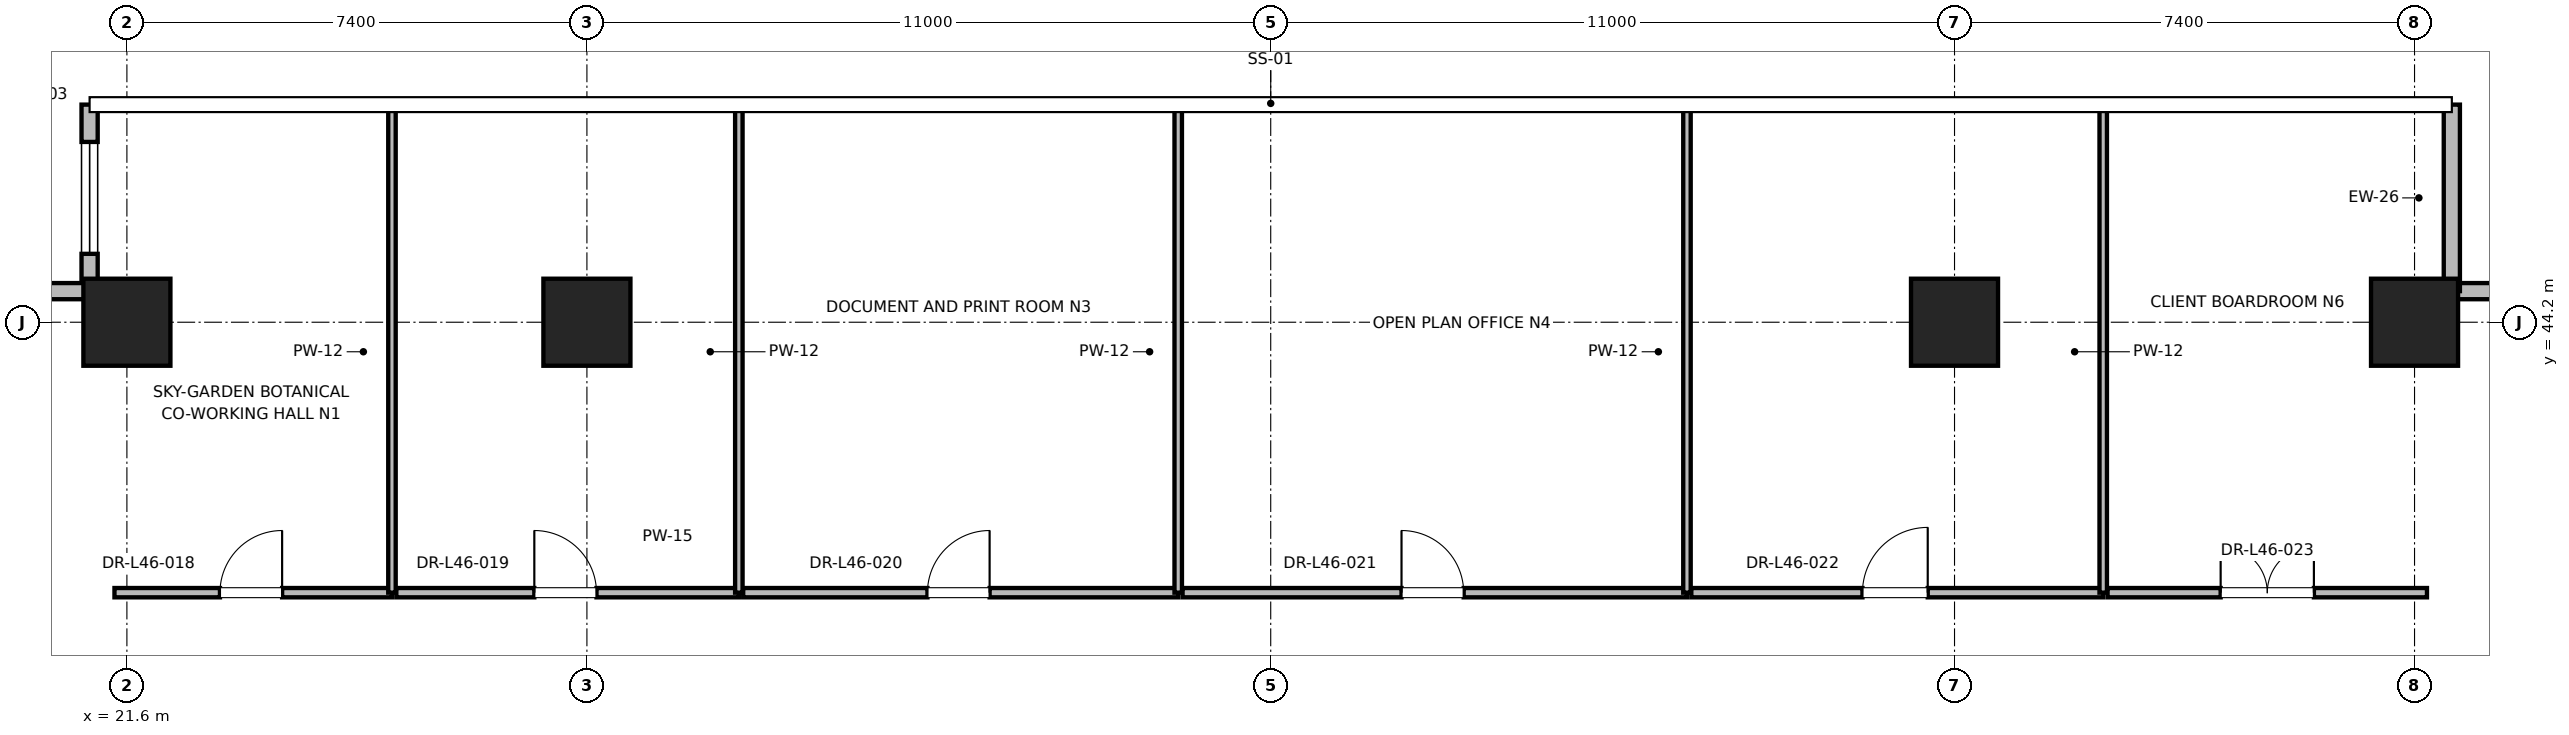
"""IFC4 building model, lengths in metres.
Left out: names, types, materials, properties, quantities, classifications, styles, units other than length and angle.
Written with IfcOpenShell. Run it as: python <this file> out.ifc"""

import sys

from ifc_helpers import new_model, si_unit, direction, frame, frame_2d, origin, origin_2d, place, context, subcontext, project, spatial, rectangle, extrude, element, fill, save


model = new_model("IFC4")
c1 = context("Model", 3, precision=1e-05, world=origin(), true_north=direction((0.0, 1.0)))
c2 = subcontext(c1, "Body", "Model", "MODEL_VIEW")
j1 = project(units=[si_unit("LENGTHUNIT", "METRE"), si_unit("PLANEANGLEUNIT", "RADIAN")], contexts=[c1])
p1 = place(None, origin())
s1 = spatial("IfcSite", under=j1, at=p1, CompositionType="ELEMENT")
p2 = place(p1, origin())
s2 = spatial("IfcBuilding", under=s1, at=p2, CompositionType="ELEMENT")
p3 = place(p2, frame((0.0, 0.0, 200.2)))
s3 = spatial("IfcBuildingStorey", under=s2, at=p3, CompositionType="ELEMENT", Elevation=200.2)
for number, where, z_axis, x_axis in (
    (1, (29.0, 44.2, 0.0), (0.0, 0.0, 1.0), (1.0, 0.0, 0.0)),
    (2, (51.0, 44.2, 0.0), (0.0, 0.0, 1.0), (1.0, 0.0, 0.0)),
    (3, (21.6, 44.2, 0.0), (0.0, 0.0, 1.0), (1.0, 0.0, 0.0)),
    (4, (58.4, 44.2, 0.0), (0.0, 0.0, 1.0), (1.0, 0.0, 0.0)),
):
    element("IfcColumn", number, at=place(p3, frame(where, z_axis=z_axis, x_axis=x_axis)), inside=s3, PredefinedType="COLUMN", context=c2, shape_type="SweptSolid", body=[
        extrude(rectangle(XDim=1.4, YDim=1.4, at=origin_2d()), origin(), (0.0, 0.0, 1.0), 5.0),
    ])
p4 = place(p3, frame((62.4, 44.7, 0.0), z_axis=(0.0, 0.0, 1.0), x_axis=(-1.0, 0.0, 0.0)))
e5 = element("IfcWall", 5, at=p4, inside=s3, PredefinedType="PARAPET", context=c2, shape_type="SweptSolid", body=[
    extrude(rectangle(XDim=3.4, YDim=0.26, at=frame_2d((1.7, 0.0))), origin(), (0.0, 0.0, 1.0), 4.775),
])
p5 = place(p4, frame((0.8, 0.0, 0.85)))
e6 = element("IfcOpeningElement", 6, at=p5, cuts=e5, PredefinedType="OPENING", context=c2, shape_type="SweptSolid", body=[
    extrude(rectangle(XDim=1.8, YDim=2.2, at=frame_2d((0.9, 1.1))), frame((0.0, 0.13, 0.0), z_axis=(0.0, -1.0, 0.0), x_axis=(1.0, 0.0, 0.0)), (0.0, 0.0, 1.0), 0.26),
])
p6 = place(p3, frame((59.0, 44.7, 0.0), z_axis=(0.0, 0.0, 1.0), x_axis=(0.0, 1.0, 0.0)))
e7 = element("IfcWall", 7, at=p6, inside=s3, PredefinedType="PARAPET", context=c2, shape_type="SweptSolid", body=[
    extrude(rectangle(XDim=3.0, YDim=0.26, at=frame_2d((1.5, 0.0))), origin(), (0.0, 0.0, 1.0), 4.775),
])
p7 = place(p3, frame((21.0, 47.7, 0.0), z_axis=(0.0, 0.0, 1.0), x_axis=(0.0, -1.0, 0.0)))
e8 = element("IfcWall", 8, at=p7, inside=s3, PredefinedType="PARAPET", context=c2, shape_type="SweptSolid", body=[
    extrude(rectangle(XDim=3.0, YDim=0.26, at=frame_2d((1.5, 0.0))), origin(), (0.0, 0.0, 1.0), 4.775),
])
p8 = place(p7, frame((0.6, 0.0, 0.85)))
e9 = element("IfcOpeningElement", 9, at=p8, cuts=e8, PredefinedType="OPENING", context=c2, shape_type="SweptSolid", body=[
    extrude(rectangle(XDim=1.8, YDim=2.2, at=frame_2d((0.9, 1.1))), frame((0.0, 0.13, 0.0), z_axis=(0.0, -1.0, 0.0), x_axis=(1.0, 0.0, 0.0)), (0.0, 0.0, 1.0), 0.26),
])
p9 = place(p3, frame((21.0, 44.7, 0.0), z_axis=(0.0, 0.0, 1.0), x_axis=(-1.0, 0.0, 0.0)))
e10 = element("IfcWall", 10, at=p9, inside=s3, PredefinedType="PARAPET", context=c2, shape_type="SweptSolid", body=[
    extrude(rectangle(XDim=3.4, YDim=0.26, at=frame_2d((1.7, 0.0))), origin(), (0.0, 0.0, 1.0), 4.775),
])
p10 = place(p3, frame((21.4, 39.85, 0.0), z_axis=(0.0, 0.0, 1.0), x_axis=(1.0, 0.0, 0.0)))
e11 = element("IfcWall", 11, at=p10, inside=s3, PredefinedType="PARTITIONING", context=c2, shape_type="SweptSolid", body=[
    extrude(rectangle(XDim=4.464, YDim=0.15, at=frame_2d((2.232, 0.0))), origin(), (0.0, 0.0, 1.0), 2.85),
])
p11 = place(p10, frame((1.697, 0.0, 0.0)))
e12 = element("IfcOpeningElement", 12, at=p11, cuts=e11, PredefinedType="OPENING", context=c2, shape_type="SweptSolid", body=[
    extrude(rectangle(XDim=1.0, YDim=2.15, at=frame_2d((0.5, 1.075))), frame((0.0, 0.075, 0.0), z_axis=(0.0, -1.0, 0.0), x_axis=(1.0, 0.0, 0.0)), (0.0, 0.0, 1.0), 0.15),
])
p12 = place(p3, frame((25.864, 39.85, 0.0), z_axis=(0.0, 0.0, 1.0), x_axis=(0.0, 1.0, 0.0)))
e13 = element("IfcWall", 13, at=p12, inside=s3, PredefinedType="PARTITIONING", context=c2, shape_type="SweptSolid", body=[
    extrude(rectangle(XDim=7.75, YDim=0.12, at=frame_2d((3.875, 0.0))), origin(), (0.0, 0.0, 1.0), 2.85),
])
p13 = place(p3, frame((25.934, 39.85, 0.0), z_axis=(0.0, 0.0, 1.0), x_axis=(1.0, 0.0, 0.0)))
e14 = element("IfcWall", 14, at=p13, inside=s3, PredefinedType="PARTITIONING", context=c2, shape_type="SweptSolid", body=[
    extrude(rectangle(XDim=5.51, YDim=0.15, at=frame_2d((2.755, 0.0))), origin(), (0.0, 0.0, 1.0), 2.85),
])
p14 = place(p13, frame((2.22, 0.0, 0.0)))
e15 = element("IfcOpeningElement", 15, at=p14, cuts=e14, PredefinedType="OPENING", context=c2, shape_type="SweptSolid", body=[
    extrude(rectangle(XDim=1.0, YDim=2.15, at=frame_2d((0.5, 1.075))), frame((0.0, 0.075, 0.0), z_axis=(0.0, -1.0, 0.0), x_axis=(1.0, 0.0, 0.0)), (0.0, 0.0, 1.0), 0.15),
])
p15 = place(p3, frame((31.444, 39.85, 0.0), z_axis=(0.0, 0.0, 1.0), x_axis=(0.0, 1.0, 0.0)))
e16 = element("IfcWall", 16, at=p15, inside=s3, PredefinedType="PARTITIONING", context=c2, shape_type="SweptSolid", body=[
    extrude(rectangle(XDim=7.75, YDim=0.12, at=frame_2d((3.875, 0.0))), origin(), (0.0, 0.0, 1.0), 2.85),
])
p16 = place(p3, frame((31.514, 39.85, 0.0), z_axis=(0.0, 0.0, 1.0), x_axis=(1.0, 0.0, 0.0)))
e17 = element("IfcWall", 17, at=p16, inside=s3, PredefinedType="PARTITIONING", context=c2, shape_type="SweptSolid", body=[
    extrude(rectangle(XDim=6.998, YDim=0.15, at=frame_2d((3.499, 0.0))), origin(), (0.0, 0.0, 1.0), 2.85),
])
p17 = place(p16, frame((2.964, 0.0, 0.0)))
e18 = element("IfcOpeningElement", 18, at=p17, cuts=e17, PredefinedType="OPENING", context=c2, shape_type="SweptSolid", body=[
    extrude(rectangle(XDim=1.0, YDim=2.15, at=frame_2d((0.5, 1.075))), frame((0.0, 0.075, 0.0), z_axis=(0.0, -1.0, 0.0), x_axis=(1.0, 0.0, 0.0)), (0.0, 0.0, 1.0), 0.15),
])
p18 = place(p3, frame((38.512, 39.85, 0.0), z_axis=(0.0, 0.0, 1.0), x_axis=(0.0, 1.0, 0.0)))
e19 = element("IfcWall", 19, at=p18, inside=s3, PredefinedType="PARTITIONING", context=c2, shape_type="SweptSolid", body=[
    extrude(rectangle(XDim=7.75, YDim=0.12, at=frame_2d((3.875, 0.0))), origin(), (0.0, 0.0, 1.0), 2.85),
])
p19 = place(p3, frame((38.582, 39.85, 0.0), z_axis=(0.0, 0.0, 1.0), x_axis=(1.0, 0.0, 0.0)))
e20 = element("IfcWall", 20, at=p19, inside=s3, PredefinedType="PARTITIONING", context=c2, shape_type="SweptSolid", body=[
    extrude(rectangle(XDim=8.114, YDim=0.15, at=frame_2d((4.057, 0.0))), origin(), (0.0, 0.0, 1.0), 2.85),
])
p20 = place(p19, frame((3.522, 0.0, 0.0)))
e21 = element("IfcOpeningElement", 21, at=p20, cuts=e20, PredefinedType="OPENING", context=c2, shape_type="SweptSolid", body=[
    extrude(rectangle(XDim=1.0, YDim=2.15, at=frame_2d((0.5, 1.075))), frame((0.0, 0.075, 0.0), z_axis=(0.0, -1.0, 0.0), x_axis=(1.0, 0.0, 0.0)), (0.0, 0.0, 1.0), 0.15),
])
p21 = place(p3, frame((46.696, 39.85, 0.0), z_axis=(0.0, 0.0, 1.0), x_axis=(0.0, 1.0, 0.0)))
e22 = element("IfcWall", 22, at=p21, inside=s3, PredefinedType="PARTITIONING", context=c2, shape_type="SweptSolid", body=[
    extrude(rectangle(XDim=7.75, YDim=0.12, at=frame_2d((3.875, 0.0))), origin(), (0.0, 0.0, 1.0), 2.85),
])
p22 = place(p3, frame((46.766, 39.85, 0.0), z_axis=(0.0, 0.0, 1.0), x_axis=(1.0, 0.0, 0.0)))
e23 = element("IfcWall", 23, at=p22, inside=s3, PredefinedType="PARTITIONING", context=c2, shape_type="SweptSolid", body=[
    extrude(rectangle(XDim=6.626, YDim=0.15, at=frame_2d((3.313, 0.0))), origin(), (0.0, 0.0, 1.0), 2.85),
])
p23 = place(p22, frame((2.753, 0.0, 0.0)))
e24 = element("IfcOpeningElement", 24, at=p23, cuts=e23, PredefinedType="OPENING", context=c2, shape_type="SweptSolid", body=[
    extrude(rectangle(XDim=1.05, YDim=2.2, at=frame_2d((0.525, 1.1))), frame((0.0, 0.075, 0.0), z_axis=(0.0, -1.0, 0.0), x_axis=(1.0, 0.0, 0.0)), (0.0, 0.0, 1.0), 0.15),
])
p24 = place(p3, frame((53.392, 39.85, 0.0), z_axis=(0.0, 0.0, 1.0), x_axis=(0.0, 1.0, 0.0)))
e25 = element("IfcWall", 25, at=p24, inside=s3, PredefinedType="PARTITIONING", context=c2, shape_type="SweptSolid", body=[
    extrude(rectangle(XDim=7.75, YDim=0.12, at=frame_2d((3.875, 0.0))), origin(), (0.0, 0.0, 1.0), 2.85),
])
p25 = place(p3, frame((53.462, 39.85, 0.0), z_axis=(0.0, 0.0, 1.0), x_axis=(1.0, 0.0, 0.0)))
e26 = element("IfcWall", 26, at=p25, inside=s3, PredefinedType="PARTITIONING", context=c2, shape_type="SweptSolid", body=[
    extrude(rectangle(XDim=5.138, YDim=0.15, at=frame_2d((2.569, 0.0))), origin(), (0.0, 0.0, 1.0), 2.85),
])
p26 = place(p25, frame((1.819, 0.0, 0.0)))
e27 = element("IfcOpeningElement", 27, at=p26, cuts=e26, PredefinedType="OPENING", context=c2, shape_type="SweptSolid", body=[
    extrude(rectangle(XDim=1.5, YDim=2.25, at=frame_2d((0.75, 1.125))), frame((0.0, 0.075, 0.0), z_axis=(0.0, -1.0, 0.0), x_axis=(1.0, 0.0, 0.0)), (0.0, 0.0, 1.0), 0.15),
])
p27 = place(p8, origin())
e28 = element("IfcWindow", 28, at=p27, inside=s3, PartitioningType="SINGLE_PANEL", PredefinedType="WINDOW", context=c2, shape_type="SweptSolid", body=[
    extrude(rectangle(XDim=1.8, YDim=2.2, at=frame_2d((0.9, 1.1))), frame((0.0, 0.03, 0.0), z_axis=(0.0, -1.0, 0.0), x_axis=(1.0, 0.0, 0.0)), (0.0, 0.0, 1.0), 0.06),
])
fill(e9, e28)
p28 = place(p11, origin())
e29 = element("IfcDoor", 29, at=p28, inside=s3, OperationType="SINGLE_SWING_RIGHT", PredefinedType="DOOR", context=c2, shape_type="SweptSolid", body=[
    extrude(rectangle(XDim=1.0, YDim=2.15, at=frame_2d((0.5, 1.075))), frame((0.0, 0.025, 0.0), z_axis=(0.0, -1.0, 0.0), x_axis=(1.0, 0.0, 0.0)), (0.0, 0.0, 1.0), 0.05),
])
fill(e12, e29)
p29 = place(p14, origin())
e30 = element("IfcDoor", 30, at=p29, inside=s3, OperationType="SINGLE_SWING_LEFT", PredefinedType="DOOR", context=c2, shape_type="SweptSolid", body=[
    extrude(rectangle(XDim=1.0, YDim=2.15, at=frame_2d((0.5, 1.075))), frame((0.0, 0.025, 0.0), z_axis=(0.0, -1.0, 0.0), x_axis=(1.0, 0.0, 0.0)), (0.0, 0.0, 1.0), 0.05),
])
fill(e15, e30)
p30 = place(p17, origin())
e31 = element("IfcDoor", 31, at=p30, inside=s3, OperationType="SINGLE_SWING_RIGHT", PredefinedType="DOOR", context=c2, shape_type="SweptSolid", body=[
    extrude(rectangle(XDim=1.0, YDim=2.15, at=frame_2d((0.5, 1.075))), frame((0.0, 0.025, 0.0), z_axis=(0.0, -1.0, 0.0), x_axis=(1.0, 0.0, 0.0)), (0.0, 0.0, 1.0), 0.05),
])
fill(e18, e31)
p31 = place(p20, origin())
e32 = element("IfcDoor", 32, at=p31, inside=s3, OperationType="SINGLE_SWING_LEFT", PredefinedType="DOOR", context=c2, shape_type="SweptSolid", body=[
    extrude(rectangle(XDim=1.0, YDim=2.15, at=frame_2d((0.5, 1.075))), frame((0.0, 0.025, 0.0), z_axis=(0.0, -1.0, 0.0), x_axis=(1.0, 0.0, 0.0)), (0.0, 0.0, 1.0), 0.05),
])
fill(e21, e32)
p32 = place(p23, origin())
e33 = element("IfcDoor", 33, at=p32, inside=s3, OperationType="SINGLE_SWING_RIGHT", PredefinedType="DOOR", context=c2, shape_type="SweptSolid", body=[
    extrude(rectangle(XDim=1.05, YDim=2.2, at=frame_2d((0.525, 1.1))), frame((0.0, 0.025, 0.0), z_axis=(0.0, -1.0, 0.0), x_axis=(1.0, 0.0, 0.0)), (0.0, 0.0, 1.0), 0.05),
])
fill(e24, e33)
p33 = place(p26, origin())
e34 = element("IfcDoor", 34, at=p33, inside=s3, OperationType="DOUBLE_DOOR_SINGLE_SWING", PredefinedType="DOOR", context=c2, shape_type="SweptSolid", body=[
    extrude(rectangle(XDim=1.5, YDim=2.25, at=frame_2d((0.75, 1.125))), frame((0.0, 0.025, 0.0), z_axis=(0.0, -1.0, 0.0), x_axis=(1.0, 0.0, 0.0)), (0.0, 0.0, 1.0), 0.05),
])
fill(e27, e34)
save(model, sys.argv[1])
